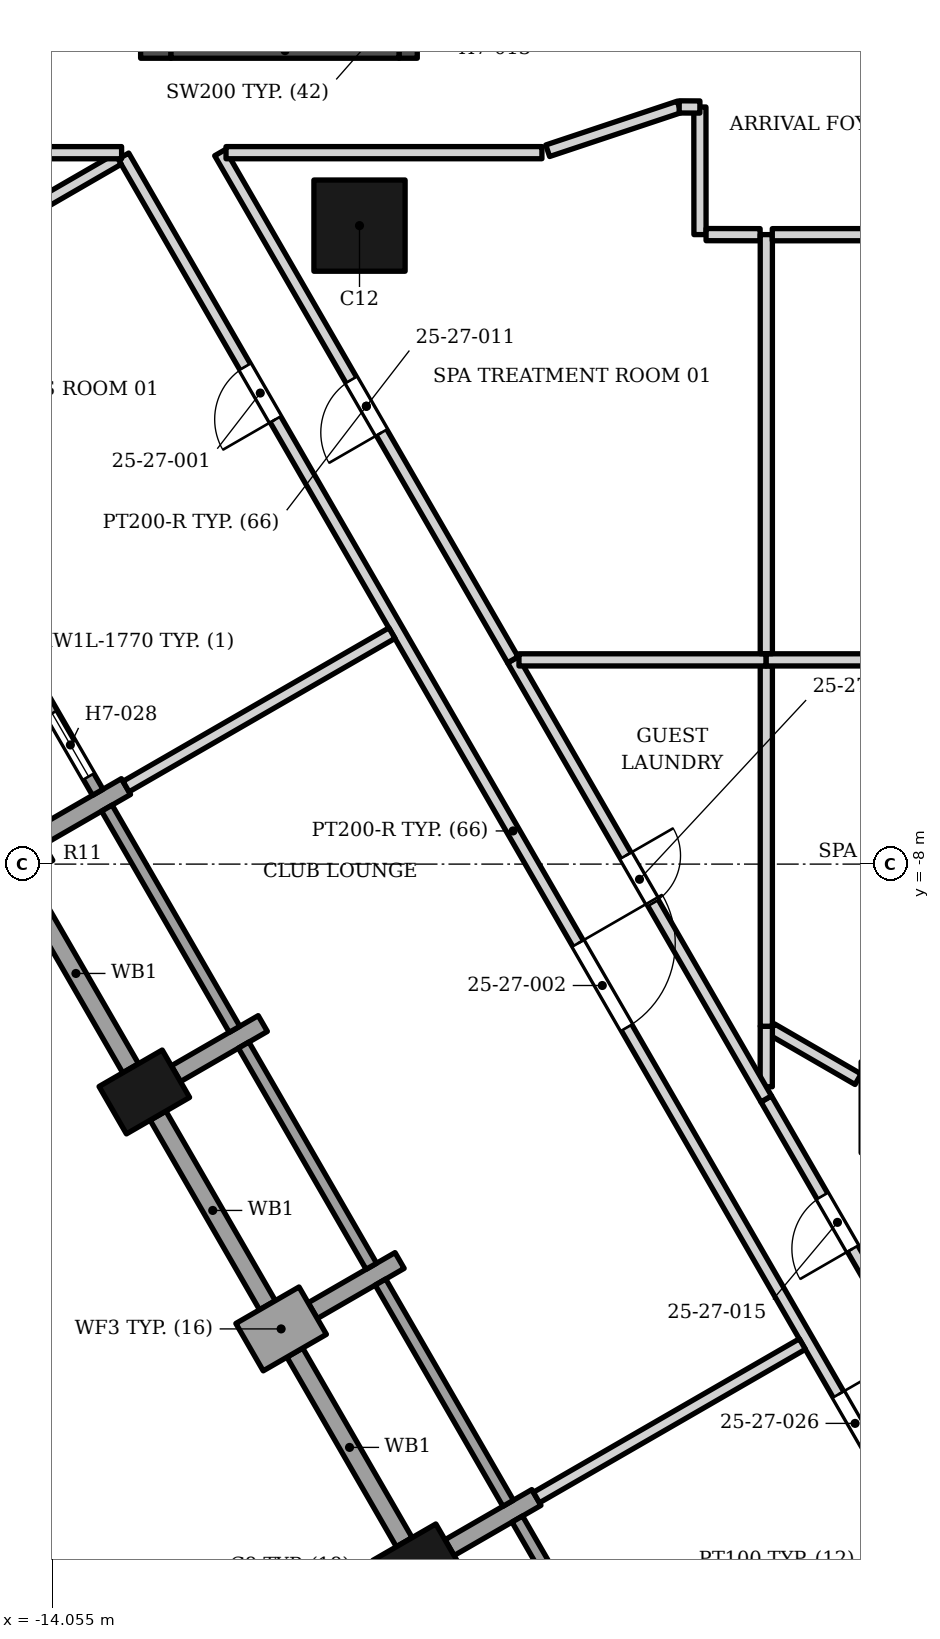
"""IFC4 building model, lengths in metres.
Left out: names, types, materials, properties, quantities, classifications, styles, units other than length and angle.
Written with IfcOpenShell. Run it as: python <this file> out.ifc"""

import sys

from ifc_helpers import new_model, si_unit, direction, frame, frame_2d, origin, origin_2d, place, context, subcontext, project, spatial, rectangle, extrude, element, fill, save


model = new_model("IFC4")
c1 = context("Model", 3, precision=1e-05, world=origin(), true_north=direction((0.0, 1.0)))
c2 = subcontext(c1, "Body", "Model", "MODEL_VIEW")
j1 = project(units=[si_unit("LENGTHUNIT", "METRE"), si_unit("PLANEANGLEUNIT", "RADIAN")], contexts=[c1])
p1 = place(None, origin())
s1 = spatial("IfcSite", under=j1, at=p1, CompositionType="ELEMENT")
p2 = place(p1, origin())
s2 = spatial("IfcBuilding", under=s1, at=p2, CompositionType="ELEMENT")
p3 = place(p2, frame((0.0, 0.0, 112.2)))
s3 = spatial("IfcBuildingStorey", under=s2, at=p3, CompositionType="ELEMENT", Elevation=112.2)
p4 = place(p3, frame((-12.35, 5.253, 0.0), z_axis=(0.0, 0.0, 1.0), x_axis=(0.0, 1.0, 0.0)))
e1 = element("IfcWall", 1, at=p4, inside=s3, PredefinedType="SHEAR", context=c2, shape_type="SweptSolid", body=[
    extrude(rectangle(XDim=13.3, YDim=0.5, at=frame_2d((6.65, 0.0))), origin(), (0.0, 0.0, 1.0), 3.4),
])
p5 = place(p3, frame((-8.2, 5.253, 0.0), z_axis=(0.0, 0.0, 1.0), x_axis=(0.0, 1.0, 0.0)))
e2 = element("IfcWall", 2, at=p5, inside=s3, PredefinedType="SHEAR", context=c2, shape_type="SweptSolid", body=[
    extrude(rectangle(XDim=13.3, YDim=0.3, at=frame_2d((6.65, 0.0))), origin(), (0.0, 0.0, 1.0), 3.4),
])
p6 = place(p5, frame((7.1, 0.0, 0.0)))
e3 = element("IfcOpeningElement", 3, at=p6, cuts=e2, PredefinedType="OPENING", context=c2, shape_type="SweptSolid", body=[
    extrude(rectangle(XDim=1.4, YDim=2.1, at=frame_2d((0.7, 1.05))), frame((0.0, 0.16, 0.0), z_axis=(0.0, -1.0, 0.0), x_axis=(1.0, 0.0, 0.0)), (0.0, 0.0, 1.0), 0.32),
])
p7 = place(p5, frame((5.05, 0.0, 0.0)))
e4 = element("IfcOpeningElement", 4, at=p7, cuts=e2, PredefinedType="OPENING", context=c2, shape_type="SweptSolid", body=[
    extrude(rectangle(XDim=1.4, YDim=2.1, at=frame_2d((0.7, 1.05))), frame((0.0, 0.16, 0.0), z_axis=(0.0, -1.0, 0.0), x_axis=(1.0, 0.0, 0.0)), (0.0, 0.0, 1.0), 0.32),
])
p8 = place(p3, frame((-12.1, 5.378, 0.0), z_axis=(0.0, 0.0, 1.0), x_axis=(1.0, 0.0, 0.0)))
e5 = element("IfcWall", 5, at=p8, inside=s3, PredefinedType="SHEAR", context=c2, shape_type="SweptSolid", body=[
    extrude(rectangle(XDim=3.75, YDim=0.25, at=frame_2d((1.875, 0.0))), origin(), (0.0, 0.0, 1.0), 3.4),
])
p9 = place(p3, frame((-9.0, 2.5, 0.0), z_axis=(0.0, 0.0, 1.0), x_axis=(1.0, 0.0, 0.0)))
e6 = element("IfcColumn", 6, at=p9, inside=s3, PredefinedType="COLUMN", context=c2, shape_type="SweptSolid", body=[
    extrude(rectangle(XDim=1.5, YDim=1.5, at=origin_2d()), origin(), (0.0, 0.0, 1.0), 3.4),
])
for number, where, z_axis, x_axis in (
    (7, (-12.539, -11.747, 0.0), (0.0, 0.0, 1.0), (0.5, -0.866, 0.0)),
    (8, (-8.039, -19.541, 0.0), (0.0, 0.0, 1.0), (0.5, -0.866, 0.0)),
):
    element("IfcColumn", number, at=place(p3, frame(where, z_axis=z_axis, x_axis=x_axis)), inside=s3, PredefinedType="COLUMN", context=c2, shape_type="SweptSolid", body=[
        extrude(rectangle(XDim=0.9, YDim=1.2, at=origin_2d()), origin(), (0.0, 0.0, 1.0), 3.4),
    ])
p10 = place(p3, frame((-15.309, -8.149, 0.0), z_axis=(0.0, 0.0, 1.0), x_axis=(0.866043267704, 0.499969057507, 0.0)))
e9 = element("IfcWall", 9, at=p10, inside=s3, PredefinedType="SOLIDWALL", context=c2, shape_type="SweptSolid", body=[
    extrude(rectangle(XDim=1.2, YDim=0.9, at=frame_2d((0.6, 0.0))), origin(), (0.0, 0.0, 1.0), 2.63),
])
p11 = place(p3, frame((-12.841, -6.725, 0.0), z_axis=(0.0, 0.0, 1.0), x_axis=(-0.866040211805, -0.499974350878, 0.0)))
e10 = element("IfcWall", 10, at=p11, inside=s3, PredefinedType="SOLIDWALL", context=c2, shape_type="SweptSolid", body=[
    extrude(rectangle(XDim=1.65, YDim=0.3, at=frame_2d((0.825, 0.0))), origin(), (0.0, 0.0, 1.0), 2.474),
])
p12 = place(p3, frame((-12.02, -11.447, 0.0), z_axis=(0.0, 0.0, 1.0), x_axis=(0.866040211805, 0.499974350878, 0.0)))
e11 = element("IfcWall", 11, at=p12, inside=s3, PredefinedType="SOLIDWALL", context=c2, shape_type="SweptSolid", body=[
    extrude(rectangle(XDim=1.65, YDim=0.3, at=frame_2d((0.825, 0.0))), origin(), (0.0, 0.0, 1.0), 2.65),
])
p13 = place(p3, frame((-10.809, -15.944, 0.0), z_axis=(0.0, 0.0, 1.0), x_axis=(0.865955154139, 0.50012165622, 0.0)))
e12 = element("IfcWall", 12, at=p13, inside=s3, PredefinedType="SOLIDWALL", context=c2, shape_type="SweptSolid", body=[
    extrude(rectangle(XDim=1.2, YDim=0.9, at=frame_2d((0.6, 0.0))), origin(), (0.0, 0.0, 1.0), 2.63),
])
p14 = place(p3, frame((-8.341, -14.519, 0.0), z_axis=(0.0, 0.0, 1.0), x_axis=(-0.866040211805, -0.499974350878, 0.0)))
e13 = element("IfcWall", 13, at=p14, inside=s3, PredefinedType="SOLIDWALL", context=c2, shape_type="SweptSolid", body=[
    extrude(rectangle(XDim=1.65, YDim=0.3, at=frame_2d((0.825, 0.0))), origin(), (0.0, 0.0, 1.0), 2.65),
])
p15 = place(p3, frame((-7.52, -19.241, 0.0), z_axis=(0.0, 0.0, 1.0), x_axis=(0.865976140824, 0.500085316245, 0.0)))
e14 = element("IfcWall", 14, at=p15, inside=s3, PredefinedType="SOLIDWALL", context=c2, shape_type="SweptSolid", body=[
    extrude(rectangle(XDim=1.65, YDim=0.3, at=frame_2d((0.825, 0.0))), origin(), (0.0, 0.0, 1.0), 2.65),
])
p16 = place(p3, frame((-15.405, -3.182, 0.0), z_axis=(0.0, 0.0, 1.0), x_axis=(0.500027713859, -0.866009402589, 0.0)))
e15 = element("IfcWall", 15, at=p16, inside=s3, PredefinedType="ELEMENTEDWALL", context=c2, shape_type="SweptSolid", body=[
    extrude(rectangle(XDim=4.2, YDim=0.2, at=frame_2d((2.1, 0.0))), origin(), (0.0, 0.0, 1.0), 2.474),
])
p17 = place(p16, frame((0.3, 0.0, 0.6)))
e16 = element("IfcOpeningElement", 16, at=p17, cuts=e15, PredefinedType="OPENING", context=c2, shape_type="SweptSolid", body=[
    extrude(rectangle(XDim=2.1, YDim=1.77, at=frame_2d((1.05, 0.885))), frame((0.0, 0.11, 0.0), z_axis=(0.0, -1.0, 0.0), x_axis=(1.0, 0.0, 0.0)), (0.0, 0.0, 1.0), 0.22),
])
p18 = place(p16, frame((2.7, 0.0, 0.0)))
e17 = element("IfcOpeningElement", 17, at=p18, cuts=e15, PredefinedType="OPENING", context=c2, shape_type="SweptSolid", body=[
    extrude(rectangle(XDim=1.2, YDim=2.37, at=frame_2d((0.6, 1.185))), frame((0.0, 0.11, 0.0), z_axis=(0.0, -1.0, 0.0), x_axis=(1.0, 0.0, 0.0)), (0.0, 0.0, 1.0), 0.22),
])
p19 = place(p3, frame((-14.564, -8.239, 0.0), z_axis=(0.0, 0.0, 1.0), x_axis=(0.500012057535, -0.866018442252, 0.0)))
e18 = element("IfcWall", 18, at=p19, inside=s3, PredefinedType="SOLIDWALL", context=c2, shape_type="SweptSolid", body=[
    extrude(rectangle(XDim=3.6, YDim=0.3, at=frame_2d((1.8, 0.0))), origin(), (0.0, 0.0, 1.0), 2.474),
])
p20 = place(p3, frame((-13.155, -7.079, 0.0), z_axis=(0.0, 0.0, 1.0), x_axis=(0.500002543286, -0.866023935413, 0.0)))
e19 = element("IfcWall", 19, at=p20, inside=s3, PredefinedType="ELEMENTEDWALL", context=c2, shape_type="SweptSolid", body=[
    extrude(rectangle(XDim=4.2, YDim=0.2, at=frame_2d((2.1, 0.0))), origin(), (0.0, 0.0, 1.0), 2.65),
])
p21 = place(p3, frame((-10.514, -15.254, 0.0), z_axis=(0.0, 0.0, 1.0), x_axis=(-0.500070795158, 0.865984526323, 0.0)))
e20 = element("IfcWall", 20, at=p21, inside=s3, PredefinedType="SOLIDWALL", context=c2, shape_type="SweptSolid", body=[
    extrude(rectangle(XDim=3.6, YDim=0.3, at=frame_2d((1.8, 0.0))), origin(), (0.0, 0.0, 1.0), 2.45),
])
p22 = place(p3, frame((-10.905, -10.977, 0.0), z_axis=(0.0, 0.0, 1.0), x_axis=(0.500027713859, -0.866009402589, 0.0)))
e21 = element("IfcWall", 21, at=p22, inside=s3, PredefinedType="ELEMENTEDWALL", context=c2, shape_type="SweptSolid", body=[
    extrude(rectangle(XDim=4.2, YDim=0.2, at=frame_2d((2.1, 0.0))), origin(), (0.0, 0.0, 1.0), 2.45),
])
p23 = place(p3, frame((-10.064, -16.033, 0.0), z_axis=(0.0, 0.0, 1.0), x_axis=(0.500012057535, -0.866018442252, 0.0)))
e22 = element("IfcWall", 22, at=p23, inside=s3, PredefinedType="SOLIDWALL", context=c2, shape_type="SweptSolid", body=[
    extrude(rectangle(XDim=3.6, YDim=0.3, at=frame_2d((1.8, 0.0))), origin(), (0.0, 0.0, 1.0), 2.63),
])
p24 = place(p3, frame((-8.655, -14.874, 0.0), z_axis=(0.0, 0.0, 1.0), x_axis=(0.500002543286, -0.866023935413, 0.0)))
e23 = element("IfcWall", 23, at=p24, inside=s3, PredefinedType="ELEMENTEDWALL", context=c2, shape_type="SweptSolid", body=[
    extrude(rectangle(XDim=4.2, YDim=0.2, at=frame_2d((2.1, 0.0))), origin(), (0.0, 0.0, 1.0), 2.65),
])
p25 = place(p3, frame((-6.405, -18.771, 0.0), z_axis=(0.0, 0.0, 1.0), x_axis=(0.500027713859, -0.866009402589, 0.0)))
e24 = element("IfcWall", 24, at=p25, inside=s3, PredefinedType="ELEMENTEDWALL", context=c2, shape_type="SweptSolid", body=[
    extrude(rectangle(XDim=4.2, YDim=0.2, at=frame_2d((2.1, 0.0))), origin(), (0.0, 0.0, 1.0), 2.628),
])
p26 = place(p3, frame((-12.882, 3.644, 0.0), z_axis=(0.0, 0.0, 1.0), x_axis=(0.500000325599, -0.866025215799, 0.0)))
e25 = element("IfcWall", 25, at=p26, inside=s3, PredefinedType="PARTITIONING", context=c2, shape_type="SweptSolid", body=[
    extrude(rectangle(XDim=25.63, YDim=0.2, at=frame_2d((12.815, 0.0))), origin(), (0.0, 0.0, 1.0), 2.384),
])
p27 = place(p26, frame((4.0, 0.0, 0.0)))
e26 = element("IfcOpeningElement", 26, at=p27, cuts=e25, PredefinedType="OPENING", context=c2, shape_type="SweptSolid", body=[
    extrude(rectangle(XDim=1.0, YDim=2.1, at=frame_2d((0.5, 1.05))), frame((0.0, 0.11, 0.0), z_axis=(0.0, -1.0, 0.0), x_axis=(1.0, 0.0, 0.0)), (0.0, 0.0, 1.0), 0.22),
])
p28 = place(p26, frame((14.95, 0.0, 0.0)))
e27 = element("IfcOpeningElement", 27, at=p28, cuts=e25, PredefinedType="OPENING", context=c2, shape_type="SweptSolid", body=[
    extrude(rectangle(XDim=1.6, YDim=2.1, at=frame_2d((0.8, 1.05))), frame((0.0, 0.11, 0.0), z_axis=(0.0, -1.0, 0.0), x_axis=(1.0, 0.0, 0.0)), (0.0, 0.0, 1.0), 0.22),
])
p29 = place(p26, frame((23.515, 0.0, 0.0)))
e28 = element("IfcOpeningElement", 28, at=p29, cuts=e25, PredefinedType="OPENING", context=c2, shape_type="SweptSolid", body=[
    extrude(rectangle(XDim=1.1, YDim=2.1, at=frame_2d((0.55, 1.05))), frame((0.0, 0.11, 0.0), z_axis=(0.0, -1.0, 0.0), x_axis=(1.0, 0.0, 0.0)), (0.0, 0.0, 1.0), 0.22),
])
p30 = place(p3, frame((-0.972, -20.323, 0.0), z_axis=(0.0, 0.0, 1.0), x_axis=(0.500646589026, 0.865651773461, 0.0)))
e29 = element("IfcWall", 29, at=p30, inside=s3, PredefinedType="PARTITIONING", context=c2, shape_type="SweptSolid", body=[
    extrude(rectangle(XDim=2.05, YDim=0.1, at=frame_2d((1.025, 0.0))), origin(), (0.0, 0.0, 1.0), 2.552),
])
p31 = place(p3, frame((-6.09, -18.416, 0.0), z_axis=(0.0, 0.0, 1.0), x_axis=(0.866164656326, 0.49975872992, 0.0)))
e30 = element("IfcWall", 30, at=p31, inside=s3, PredefinedType="PARTITIONING", context=c2, shape_type="SweptSolid", body=[
    extrude(rectangle(XDim=5.049, YDim=0.2, at=frame_2d((2.525, 0.0))), origin(), (0.0, 0.0, 1.0), 2.628),
])
p32 = place(p3, frame((-2.311, -11.861, 0.0), z_axis=(0.0, 0.0, 1.0), x_axis=(0.499977492351, -0.866038398192, 0.0)))
e31 = element("IfcWall", 31, at=p32, inside=s3, PredefinedType="PARTITIONING", context=c2, shape_type="SweptSolid", body=[
    extrude(rectangle(XDim=4.392, YDim=0.2, at=frame_2d((2.196, 0.0))), origin(), (0.0, 0.0, 1.0), 2.45),
])
p33 = place(p32, frame((1.844, 0.0, 0.0)))
e32 = element("IfcOpeningElement", 32, at=p33, cuts=e31, PredefinedType="OPENING", context=c2, shape_type="SweptSolid", body=[
    extrude(rectangle(XDim=1.0, YDim=2.1, at=frame_2d((0.5, 1.05))), frame((0.0, 0.11, 0.0), z_axis=(0.0, -1.0, 0.0), x_axis=(1.0, 0.0, 0.0)), (0.0, 0.0, 1.0), 0.22),
])
p34 = place(p3, frame((-2.225, -10.714, 0.0), z_axis=(0.0, 0.0, 1.0), x_axis=(0.865565051919, -0.500796506474, 0.0)))
e33 = element("IfcWall", 33, at=p34, inside=s3, PredefinedType="PARTITIONING", context=c2, shape_type="SweptSolid", body=[
    extrude(rectangle(XDim=1.646, YDim=0.2, at=frame_2d((0.823, 0.0))), origin(), (0.0, 0.0, 1.0), 3.23),
])
p35 = place(p3, frame((-2.311, -11.662, 0.0), z_axis=(0.0, 0.0, 1.0), x_axis=(0.001472029808, 0.999998916564, 0.0)))
e34 = element("IfcWall", 34, at=p35, inside=s3, PredefinedType="PARTITIONING", context=c2, shape_type="SweptSolid", body=[
    extrude(rectangle(XDim=0.995, YDim=0.2, at=frame_2d((0.498, 0.0))), origin(), (0.0, 0.0, 1.0), 3.23),
])
p36 = place(p3, frame((-2.31, -10.667, 0.0), z_axis=(0.0, 0.0, 1.0), x_axis=(0.0, 1.0, 0.0)))
e35 = element("IfcWall", 35, at=p36, inside=s3, PredefinedType="PARTITIONING", context=c2, shape_type="SweptSolid", body=[
    extrude(rectangle(XDim=5.927, YDim=0.2, at=frame_2d((2.963, 0.0))), origin(), (0.0, 0.0, 1.0), 3.23),
])
p37 = place(p3, frame((-6.478, -4.641, 0.0), z_axis=(0.0, 0.0, 1.0), x_axis=(0.499806127846, -0.866137306994, 0.0)))
e36 = element("IfcWall", 36, at=p37, inside=s3, PredefinedType="PARTITIONING", context=c2, shape_type="SweptSolid", body=[
    extrude(rectangle(XDim=8.335, YDim=0.2, at=frame_2d((4.167, 0.0))), origin(), (0.0, 0.0, 1.0), 2.384),
])
p38 = place(p37, frame((3.716, 0.0, 0.0)))
e37 = element("IfcOpeningElement", 37, at=p38, cuts=e36, PredefinedType="OPENING", context=c2, shape_type="SweptSolid", body=[
    extrude(rectangle(XDim=0.9, YDim=2.1, at=frame_2d((0.45, 1.05))), frame((0.0, 0.11, 0.0), z_axis=(0.0, -1.0, 0.0), x_axis=(1.0, 0.0, 0.0)), (0.0, 0.0, 1.0), 0.22),
])
p39 = place(p3, frame((-6.378, -4.641, 0.0), z_axis=(0.0, 0.0, 1.0), x_axis=(1.0, 0.0, 0.0)))
e38 = element("IfcWall", 38, at=p39, inside=s3, PredefinedType="PARTITIONING", context=c2, shape_type="SweptSolid", body=[
    extrude(rectangle(XDim=4.066, YDim=0.2, at=frame_2d((2.033, 0.0))), origin(), (0.0, 0.0, 1.0), 2.384),
])
p40 = place(p3, frame((-2.311, -4.641, 0.0), z_axis=(0.0, 0.0, 1.0), x_axis=(1.0, 0.0, 0.0)))
e39 = element("IfcWall", 39, at=p40, inside=s3, PredefinedType="PARTITIONING", context=c2, shape_type="SweptSolid", body=[
    extrude(rectangle(XDim=8.56, YDim=0.2, at=frame_2d((4.28, 0.0))), origin(), (0.0, 0.0, 1.0), 2.384),
])
p41 = place(p3, frame((-12.84, -6.725, 0.0), z_axis=(0.0, 0.0, 1.0), x_axis=(0.866209732401, 0.499680597475, 0.0)))
e40 = element("IfcWall", 40, at=p41, inside=s3, PredefinedType="PARTITIONING", context=c2, shape_type="SweptSolid", body=[
    extrude(rectangle(XDim=5.05, YDim=0.2, at=frame_2d((2.525, 0.0))), origin(), (0.0, 0.0, 1.0), 2.552),
])
p42 = place(p3, frame((-17.341, 1.07, 0.0), z_axis=(0.0, 0.0, 1.0), x_axis=(0.865894858421, 0.500226043064, 0.0)))
e41 = element("IfcWall", 41, at=p42, inside=s3, PredefinedType="PARTITIONING", context=c2, shape_type="SweptSolid", body=[
    extrude(rectangle(XDim=5.05, YDim=0.2, at=frame_2d((2.525, 0.0))), origin(), (0.0, 0.0, 1.0), 2.474),
])
p43 = place(p3, frame((-3.402, 4.451, 0.0), z_axis=(0.0, 0.0, 1.0), x_axis=(0.000930881607, -0.99999956673, 0.0)))
e42 = element("IfcWall", 42, at=p43, inside=s3, PredefinedType="PARTITIONING", context=c2, shape_type="SweptSolid", body=[
    extrude(rectangle(XDim=2.098, YDim=0.2, at=frame_2d((1.049, 0.0))), origin(), (0.0, 0.0, 1.0), 3.23),
])
p44 = place(p3, frame((-3.3, 2.352, 0.0), z_axis=(0.0, 0.0, 1.0), x_axis=(0.999998150893, -0.001923073367, 0.0)))
e43 = element("IfcWall", 43, at=p44, inside=s3, PredefinedType="PARTITIONING", context=c2, shape_type="SweptSolid", body=[
    extrude(rectangle(XDim=0.889, YDim=0.2, at=frame_2d((0.444, 0.0))), origin(), (0.0, 0.0, 1.0), 3.23),
])
p45 = place(p3, frame((-2.31, -4.539, 0.0), z_axis=(0.0, 0.0, 1.0), x_axis=(0.0, 1.0, 0.0)))
e44 = element("IfcWall", 44, at=p45, inside=s3, PredefinedType="PARTITIONING", context=c2, shape_type="SweptSolid", body=[
    extrude(rectangle(XDim=6.892, YDim=0.2, at=frame_2d((3.446, 0.0))), origin(), (0.0, 0.0, 1.0), 3.23),
])
p46 = place(p3, frame((-2.211, 2.351, 0.0), z_axis=(0.0, 0.0, 1.0), x_axis=(0.999999953622, 0.00030455968, 0.0)))
e45 = element("IfcWall", 45, at=p46, inside=s3, PredefinedType="PARTITIONING", context=c2, shape_type="SweptSolid", body=[
    extrude(rectangle(XDim=5.611, YDim=0.2, at=frame_2d((2.806, 0.0))), origin(), (0.0, 0.0, 1.0), 3.23),
])
p47 = place(p46, frame((2.255, 0.0, 0.0)))
e46 = element("IfcOpeningElement", 46, at=p47, cuts=e45, PredefinedType="OPENING", context=c2, shape_type="SweptSolid", body=[
    extrude(rectangle(XDim=1.0, YDim=2.1, at=frame_2d((0.5, 1.05))), frame((0.0, 0.11, 0.0), z_axis=(0.0, -1.0, 0.0), x_axis=(1.0, 0.0, 0.0)), (0.0, 0.0, 1.0), 0.22),
])
p48 = place(p3, frame((-14.3, 3.699, 0.0), z_axis=(0.0, 0.0, 1.0), x_axis=(1.0, 0.0, 0.0)))
e47 = element("IfcWall", 47, at=p48, inside=s3, PredefinedType="PARTITIONING", context=c2, shape_type="SweptSolid", body=[
    extrude(rectangle(XDim=1.387, YDim=0.2, at=frame_2d((0.694, 0.0))), origin(), (0.0, 0.0, 1.0), 2.474),
])
p49 = place(p3, frame((-11.295, 3.7, 0.0), z_axis=(0.0, 0.0, 1.0), x_axis=(0.500160597015, -0.865932663198, 0.0)))
e48 = element("IfcWall", 48, at=p49, inside=s3, PredefinedType="PARTITIONING", context=c2, shape_type="SweptSolid", body=[
    extrude(rectangle(XDim=9.63, YDim=0.2, at=frame_2d((4.815, 0.0))), origin(), (0.0, 0.0, 1.0), 2.552),
])
p50 = place(p49, frame((4.315, 0.0, 0.0)))
e49 = element("IfcOpeningElement", 49, at=p50, cuts=e48, PredefinedType="OPENING", context=c2, shape_type="SweptSolid", body=[
    extrude(rectangle(XDim=1.0, YDim=2.1, at=frame_2d((0.5, 1.05))), frame((0.0, 0.11, 0.0), z_axis=(0.0, -1.0, 0.0), x_axis=(1.0, 0.0, 0.0)), (0.0, 0.0, 1.0), 0.22),
])
p51 = place(p3, frame((-11.195, 3.7, 0.0), z_axis=(0.0, 0.0, 1.0), x_axis=(1.0, 0.0, 0.0)))
e50 = element("IfcWall", 50, at=p51, inside=s3, PredefinedType="PARTITIONING", context=c2, shape_type="SweptSolid", body=[
    extrude(rectangle(XDim=5.195, YDim=0.2, at=frame_2d((2.598, 0.0))), origin(), (0.0, 0.0, 1.0), 2.832),
])
p52 = place(p3, frame((-5.905, 3.731, 0.0), z_axis=(0.0, 0.0, 1.0), x_axis=(0.948683298051, 0.316227766017, 0.0)))
e51 = element("IfcWall", 51, at=p52, inside=s3, PredefinedType="PARTITIONING", context=c2, shape_type="SweptSolid", body=[
    extrude(rectangle(XDim=2.28, YDim=0.2, at=frame_2d((1.14, 0.0))), origin(), (0.0, 0.0, 1.0), 2.384),
])
p53 = place(p3, frame((-3.742, 4.452, 0.0), z_axis=(0.0, 0.0, 1.0), x_axis=(0.999987374295, -0.005025062182, 0.0)))
e52 = element("IfcWall", 52, at=p53, inside=s3, PredefinedType="PARTITIONING", context=c2, shape_type="SweptSolid", body=[
    extrude(rectangle(XDim=0.34, YDim=0.2, at=frame_2d((0.17, 0.0))), origin(), (0.0, 0.0, 1.0), 3.23),
])
p54 = place(p18, origin())
e53 = element("IfcDoor", 53, at=p54, inside=s3, OperationType="SINGLE_SWING_LEFT", PredefinedType="DOOR", context=c2, shape_type="SweptSolid", body=[
    extrude(rectangle(XDim=1.2, YDim=2.37, at=frame_2d((0.6, 1.185))), frame((0.0, 0.025, 0.0), z_axis=(0.0, -1.0, 0.0), x_axis=(1.0, 0.0, 0.0)), (0.0, 0.0, 1.0), 0.05),
])
fill(e17, e53)
p55 = place(p27, origin())
e54 = element("IfcDoor", 54, at=p55, inside=s3, OperationType="SINGLE_SWING_RIGHT", PredefinedType="DOOR", context=c2, shape_type="SweptSolid", body=[
    extrude(rectangle(XDim=1.0, YDim=2.1, at=frame_2d((0.5, 1.05))), frame((0.0, 0.025, 0.0), z_axis=(0.0, -1.0, 0.0), x_axis=(1.0, 0.0, 0.0)), (0.0, 0.0, 1.0), 0.05),
])
fill(e26, e54)
p56 = place(p28, origin())
e55 = element("IfcDoor", 55, at=p56, inside=s3, OperationType="DOUBLE_DOOR_SINGLE_SWING", PredefinedType="DOOR", context=c2, shape_type="SweptSolid", body=[
    extrude(rectangle(XDim=1.6, YDim=2.1, at=frame_2d((0.8, 1.05))), frame((0.0, 0.025, 0.0), z_axis=(0.0, -1.0, 0.0), x_axis=(1.0, 0.0, 0.0)), (0.0, 0.0, 1.0), 0.05),
])
fill(e27, e55)
p57 = place(p50, origin())
e56 = element("IfcDoor", 56, at=p57, inside=s3, OperationType="SINGLE_SWING_RIGHT", PredefinedType="DOOR", context=c2, shape_type="SweptSolid", body=[
    extrude(rectangle(XDim=1.0, YDim=2.1, at=frame_2d((0.5, 1.05))), frame((0.0, 0.025, 0.0), z_axis=(0.0, -1.0, 0.0), x_axis=(1.0, 0.0, 0.0)), (0.0, 0.0, 1.0), 0.05),
])
fill(e49, e56)
p58 = place(p38, origin())
e57 = element("IfcDoor", 57, at=p58, inside=s3, OperationType="SINGLE_SWING_LEFT", PredefinedType="DOOR", context=c2, shape_type="SweptSolid", body=[
    extrude(rectangle(XDim=0.9, YDim=2.1, at=frame_2d((0.45, 1.05))), frame((0.0, 0.025, 0.0), z_axis=(0.0, -1.0, 0.0), x_axis=(1.0, 0.0, 0.0)), (0.0, 0.0, 1.0), 0.05),
])
fill(e37, e57)
p59 = place(p33, origin())
e58 = element("IfcDoor", 58, at=p59, inside=s3, OperationType="SINGLE_SWING_RIGHT", PredefinedType="DOOR", context=c2, shape_type="SweptSolid", body=[
    extrude(rectangle(XDim=1.0, YDim=2.1, at=frame_2d((0.5, 1.05))), frame((0.0, 0.025, 0.0), z_axis=(0.0, -1.0, 0.0), x_axis=(1.0, 0.0, 0.0)), (0.0, 0.0, 1.0), 0.05),
])
fill(e32, e58)
p60 = place(p29, origin())
e59 = element("IfcDoor", 59, at=p60, inside=s3, OperationType="SINGLE_SWING_LEFT", PredefinedType="DOOR", context=c2, shape_type="SweptSolid", body=[
    extrude(rectangle(XDim=1.1, YDim=2.1, at=frame_2d((0.55, 1.05))), frame((0.0, 0.025, 0.0), z_axis=(0.0, -1.0, 0.0), x_axis=(1.0, 0.0, 0.0)), (0.0, 0.0, 1.0), 0.05),
])
fill(e28, e59)
save(model, sys.argv[1])
